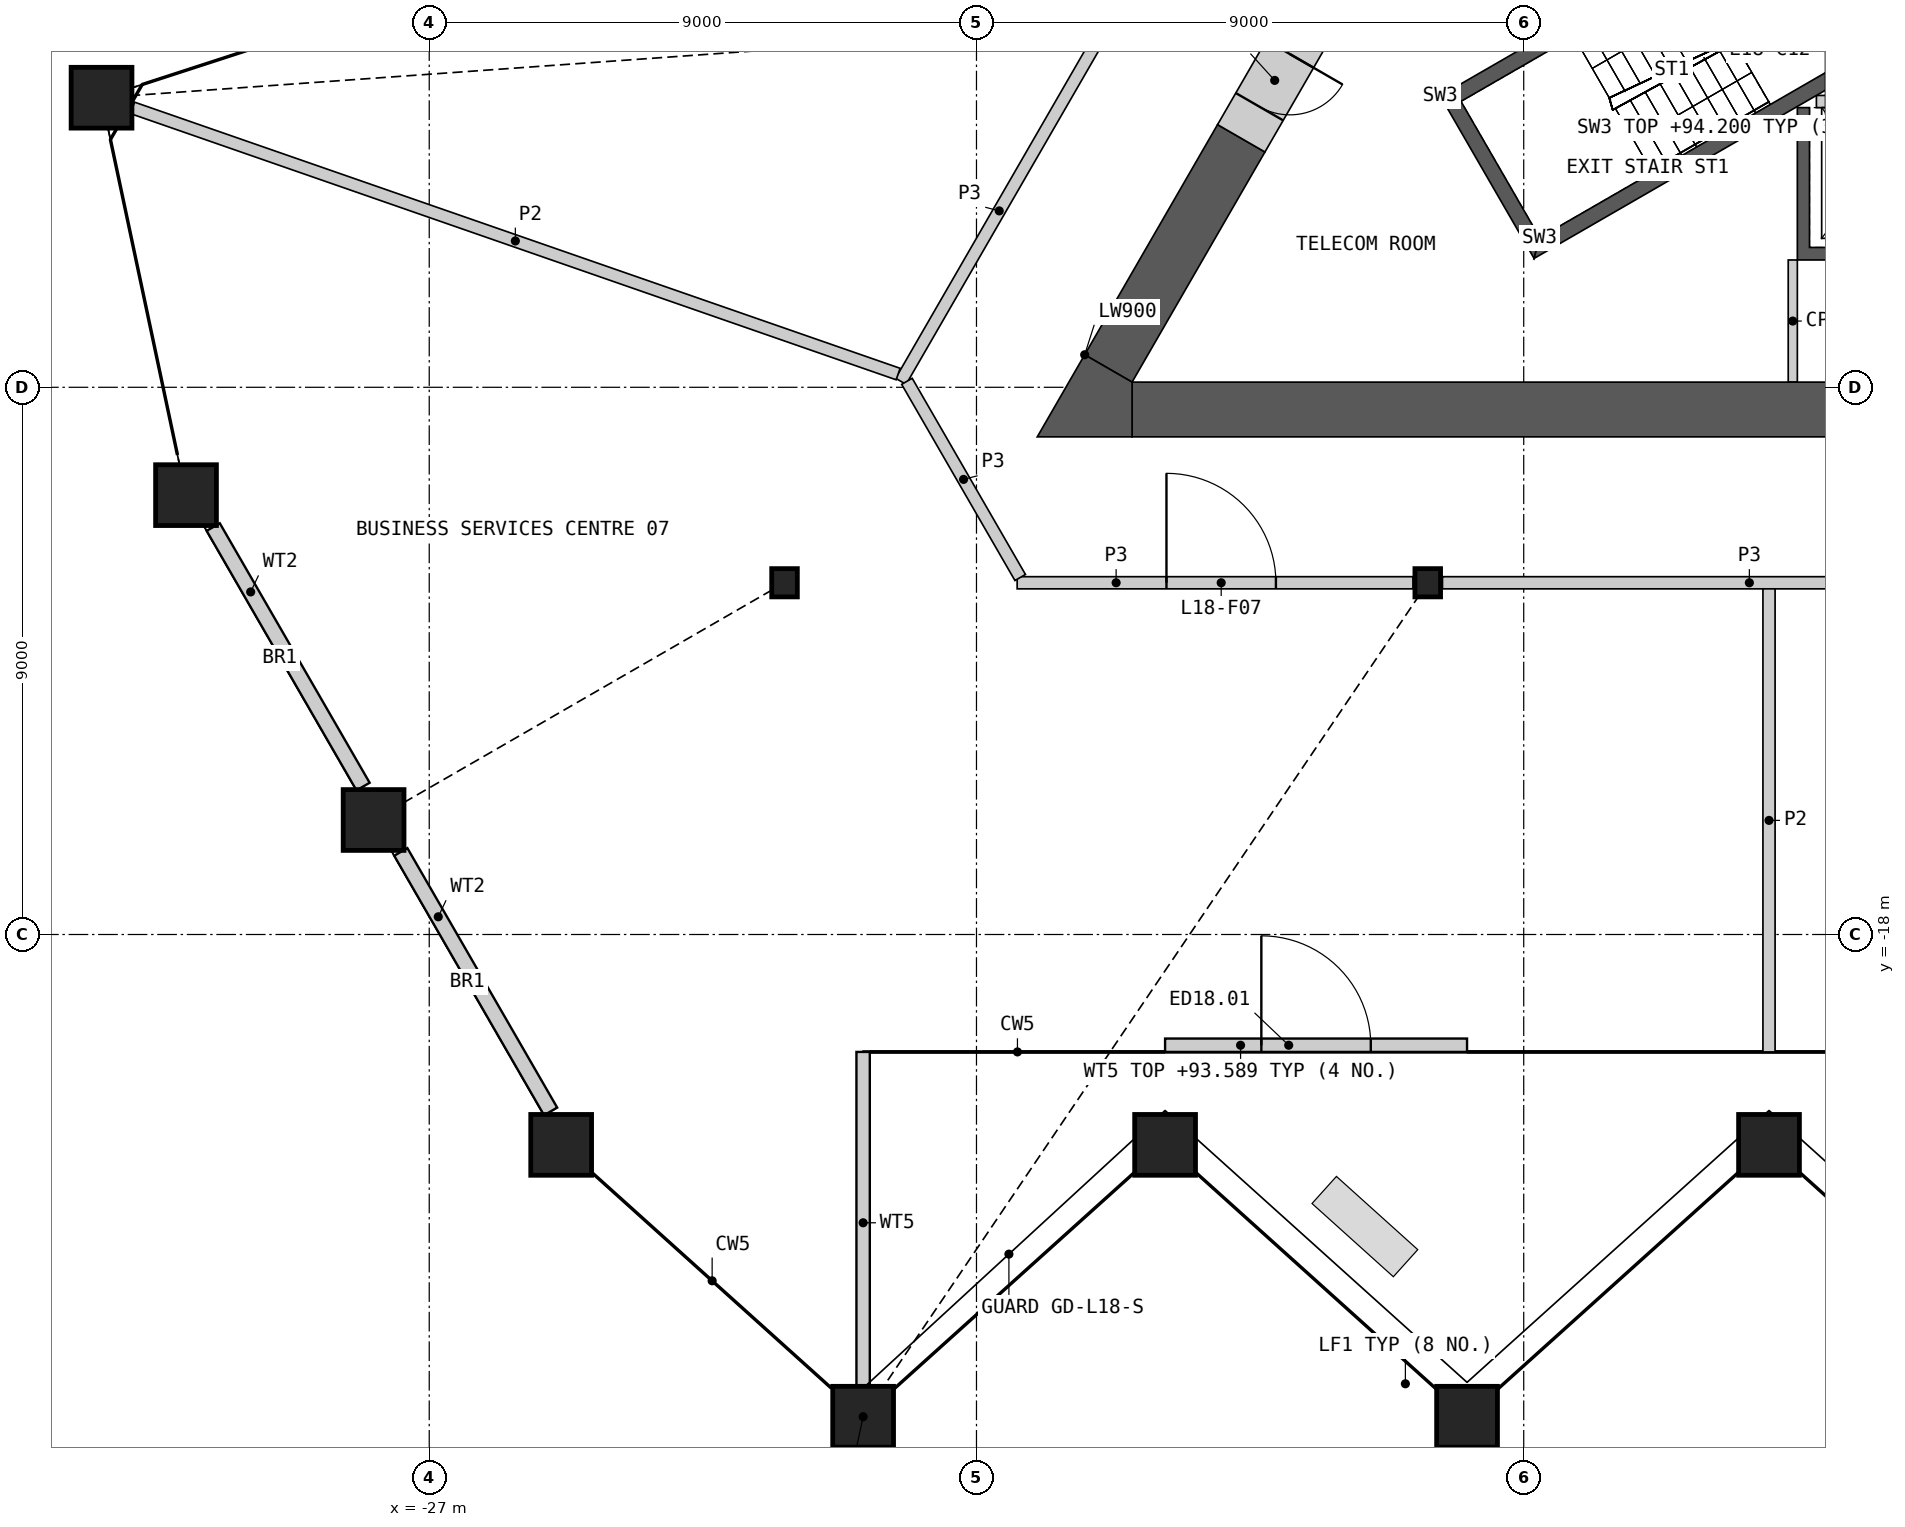
"""IFC4 building model, lengths in metres.
Left out: names, types, materials, properties, quantities, classifications, styles, units other than length and angle.
Written with IfcOpenShell. Run it as: python <this file> out.ifc"""

import sys

from ifc_helpers import new_model, si_unit, direction, frame, frame_2d, origin, origin_2d, place, context, subcontext, project, spatial, polyline, rectangle, hollow_rectangle, i_section, outline, extrude, element, fill, save


model = new_model("IFC4")
c1 = context("Model", 3, precision=1e-05, world=origin(), true_north=direction((0.0, 1.0)))
c2 = subcontext(c1, "Body", "Model", "MODEL_VIEW")
j1 = project(units=[si_unit("LENGTHUNIT", "METRE"), si_unit("PLANEANGLEUNIT", "RADIAN")], contexts=[c1])
p1 = place(None, origin())
s1 = spatial("IfcSite", under=j1, at=p1, CompositionType="ELEMENT")
p2 = place(p1, origin())
s2 = spatial("IfcBuilding", under=s1, at=p2, CompositionType="ELEMENT")
p3 = place(p2, frame((0.0, 0.0, 84.6)))
s3 = spatial("IfcBuildingStorey", under=s2, at=p3, CompositionType="ELEMENT", Elevation=84.6)
for number, where, z_axis, x_axis in (
    (1, (-24.83, -21.46, 0.0), (0.0, 0.0, 1.0), (1.0, 0.0, 0.0)),
    (2, (-19.864, -25.931, 0.0), (0.0, 0.0, 1.0), (1.0, 0.0, 0.0)),
    (3, (-14.898, -21.46, 0.0), (0.0, 0.0, 1.0), (1.0, 0.0, 0.0)),
    (4, (-9.932, -25.931, 0.0), (0.0, 0.0, 1.0), (1.0, 0.0, 0.0)),
    (5, (-4.966, -21.46, 0.0), (0.0, 0.0, 1.0), (1.0, 0.0, 0.0)),
    (6, (-32.389, -4.237, 0.0), (0.0, 0.0, 1.0), (1.0, 0.0, 0.0)),
    (7, (-31.0, -10.774, 0.0), (0.0, 0.0, 1.0), (1.0, 0.0, 0.0)),
    (8, (-27.915, -16.117, 0.0), (0.0, 0.0, 1.0), (1.0, 0.0, 0.0)),
):
    element("IfcColumn", number, at=place(p3, frame(where, z_axis=z_axis, x_axis=x_axis)), inside=s3, PredefinedType="COLUMN", context=c2, shape_type="SweptSolid", body=[
        extrude(hollow_rectangle(XDim=1.0, YDim=1.0, WallThickness=0.07, at=origin_2d()), origin(), (0.0, 0.0, 1.0), 10.0),
    ])
for number, where, z_axis, x_axis in (
    (9, (-21.157, -12.215, 0.0), (0.0, 0.0, 1.0), (1.0, 0.0, 0.0)),
    (10, (-10.578, -12.215, 0.0), (0.0, 0.0, 1.0), (1.0, 0.0, 0.0)),
):
    element("IfcColumn", number, at=place(p3, frame(where, z_axis=z_axis, x_axis=x_axis)), inside=s3, PredefinedType="COLUMN", context=c2, shape_type="SweptSolid", body=[
        extrude(i_section(OverallWidth=0.421, OverallDepth=0.465, WebThickness=0.045, FlangeThickness=0.072, at=origin_2d()), origin(), (0.0, 0.0, 1.0), 10.0),
    ])
for number, where, z_axis, x_axis in (
    (11, (-30.552, -11.299, 0.0), (0.0, 0.0, 1.0), (0.5, -0.866, 0.0)),
    (12, (-27.468, -16.642, 0.0), (0.0, 0.0, 1.0), (0.5, -0.866, 0.0)),
):
    element("IfcWall", number, at=place(p3, frame(where, z_axis=z_axis, x_axis=x_axis)), inside=s3, PredefinedType="SOLIDWALL", context=c2, shape_type="SweptSolid", body=[
        extrude(rectangle(XDim=4.928, YDim=0.25, at=frame_2d((2.464, 0.0))), origin(), (0.0, 0.0, 1.0), 8.989),
    ])
p4 = place(p3, frame((-14.898, -19.821, 0.0), z_axis=(0.0, 0.0, 1.0), x_axis=(1.0, 0.0, 0.0)))
e13 = element("IfcWall", 13, at=p4, inside=s3, PredefinedType="SOLIDWALL", context=c2, shape_type="SweptSolid", body=[
    extrude(rectangle(XDim=4.966, YDim=0.22, at=frame_2d((2.483, 0.0))), origin(), (0.0, 0.0, 1.0), 8.989),
])
p5 = place(p4, frame((1.583, 0.0, 0.0)))
e14 = element("IfcOpeningElement", 14, at=p5, cuts=e13, PredefinedType="OPENING", context=c2, shape_type="SweptSolid", body=[
    extrude(rectangle(XDim=1.8, YDim=2.4, at=frame_2d((0.9, 1.2))), frame((0.0, 0.12, 0.0), z_axis=(0.0, -1.0, 0.0), x_axis=(1.0, 0.0, 0.0)), (0.0, 0.0, 1.0), 0.24),
])
p6 = place(p3, frame((-19.864, -25.551, 0.0), z_axis=(0.0, 0.0, 1.0), x_axis=(0.0, 1.0, 0.0)))
e15 = element("IfcWall", 15, at=p6, inside=s3, PredefinedType="SOLIDWALL", context=c2, shape_type="SweptSolid", body=[
    extrude(rectangle(XDim=5.62, YDim=0.22, at=frame_2d((2.81, 0.0))), origin(), (0.0, 0.0, 1.0), 8.989),
])
p7 = place(p3, origin())
e16 = element("IfcWall", 16, at=p7, inside=s3, PredefinedType="SHEAR", context=c2, shape_type="SweptSolid", body=[
    extrude(outline(polyline([(4.5, -4.4), (4.5, -6.906), (-4.5, -6.906), (-4.5, -4.4), (-4.3, -4.4), (-4.3, -6.7), (-2.3, -6.7), (-2.3, -4.4), (-2.1, -4.4), (-2.1, -6.7), (-0.1, -6.7), (-0.1, -4.4), (0.1, -4.4), (0.1, -6.7), (2.1, -6.7), (2.1, -4.4), (2.3, -4.4), (2.3, -6.7), (4.3, -6.7), (4.3, -4.4), (4.5, -4.4)])), origin(), (0.0, 0.0, 1.0), 9.6),
])
p8 = place(p3, frame((-4.187, -4.3, 0.0), z_axis=(0.0, 0.0, 1.0), x_axis=(1.0, 0.0, 0.0)))
e17 = element("IfcWall", 17, at=p8, inside=s3, PredefinedType="SOLIDWALL", context=c2, shape_type="SweptSolid", body=[
    extrude(rectangle(XDim=8.373, YDim=0.2, at=frame_2d((4.187, 0.0))), origin(), (0.0, 0.0, 1.0), 9.6),
])
p9 = place(p8, frame((0.287, 0.0, 0.0)))
e18 = element("IfcOpeningElement", 18, at=p9, cuts=e17, PredefinedType="OPENING", context=c2, shape_type="SweptSolid", body=[
    extrude(rectangle(XDim=1.2, YDim=2.1, at=frame_2d((0.6, 1.05))), frame((0.0, 0.11, 0.0), z_axis=(0.0, -1.0, 0.0), x_axis=(1.0, 0.0, 0.0)), (0.0, 0.0, 1.0), 0.22),
])
p10 = place(p8, frame((2.387, 0.0, 0.0)))
e19 = element("IfcOpeningElement", 19, at=p10, cuts=e17, PredefinedType="OPENING", context=c2, shape_type="SweptSolid", body=[
    extrude(rectangle(XDim=1.4, YDim=2.1, at=frame_2d((0.7, 1.05))), frame((0.0, 0.11, 0.0), z_axis=(0.0, -1.0, 0.0), x_axis=(1.0, 0.0, 0.0)), (0.0, 0.0, 1.0), 0.22),
])
p11 = place(p8, frame((4.737, 0.0, 0.0)))
e20 = element("IfcOpeningElement", 20, at=p11, cuts=e17, PredefinedType="OPENING", context=c2, shape_type="SweptSolid", body=[
    extrude(rectangle(XDim=1.1, YDim=2.1, at=frame_2d((0.55, 1.05))), frame((0.0, 0.11, 0.0), z_axis=(0.0, -1.0, 0.0), x_axis=(1.0, 0.0, 0.0)), (0.0, 0.0, 1.0), 0.22),
])
p12 = place(p8, frame((6.887, 0.0, 0.0)))
e21 = element("IfcOpeningElement", 21, at=p12, cuts=e17, PredefinedType="OPENING", context=c2, shape_type="SweptSolid", body=[
    extrude(rectangle(XDim=1.2, YDim=2.1, at=frame_2d((0.6, 1.05))), frame((0.0, 0.11, 0.0), z_axis=(0.0, -1.0, 0.0), x_axis=(1.0, 0.0, 0.0)), (0.0, 0.0, 1.0), 0.22),
])
p13 = place(p3, origin())
e22 = element("IfcWall", 22, at=p13, inside=s3, PredefinedType="SHEAR", context=c2, shape_type="SweptSolid", body=[
    extrude(outline(polyline([(-5.307, -1.281), (-10.374, -4.206), (-10.032, -4.298), (-5.182, -1.498), (-5.307, -1.281)])), origin(), (0.0, 0.0, 1.0), 9.6),
])
p14 = place(p3, origin())
e23 = element("IfcWall", 23, at=p14, inside=s3, PredefinedType="SHEAR", context=c2, shape_type="SweptSolid", body=[
    extrude(outline(polyline([(-10.374, -4.206), (-8.83, -6.881), (-8.738, -6.539), (-10.032, -4.298), (-10.374, -4.206)])), origin(), (0.0, 0.0, 1.0), 9.6),
])
p15 = place(p3, origin())
e24 = element("IfcWall", 24, at=p15, inside=s3, PredefinedType="SHEAR", context=c2, shape_type="SweptSolid", body=[
    extrude(outline(polyline([(-8.738, -6.539), (-8.83, -6.881), (-3.763, -3.956), (-3.888, -3.739), (-8.738, -6.539)])), origin(), (0.0, 0.0, 1.0), 9.6),
])
p16 = place(p3, frame((-5.199, -1.219, 0.0), z_axis=(0.0, 0.0, 1.0), x_axis=(0.499982516597, -0.866035497597, 0.0)))
e25 = element("IfcWall", 25, at=p16, inside=s3, PredefinedType="SHEAR", context=c2, shape_type="SweptSolid", body=[
    extrude(rectangle(XDim=3.088, YDim=0.25, at=frame_2d((1.544, 0.0))), origin(), (0.0, 0.0, 1.0), 9.6),
])
p17 = place(p16, frame((0.994, 0.0, 0.0)))
e26 = element("IfcOpeningElement", 26, at=p17, cuts=e25, PredefinedType="OPENING", context=c2, shape_type="SweptSolid", body=[
    extrude(rectangle(XDim=1.1, YDim=2.1, at=frame_2d((0.55, 1.05))), frame((0.0, 0.135, 0.0), z_axis=(0.0, -1.0, 0.0), x_axis=(1.0, 0.0, 0.0)), (0.0, 0.0, 1.0), 0.27),
])
p18 = place(p3, frame((-4.575, -6.906, 0.0), z_axis=(0.0, 0.0, 1.0), x_axis=(0.0, -1.0, 0.0)))
e27 = element("IfcWall", 27, at=p18, inside=s3, PredefinedType="PARTITIONING", context=c2, shape_type="SweptSolid", body=[
    extrude(rectangle(XDim=2.009, YDim=0.15, at=frame_2d((1.004, 0.0))), origin(), (0.0, 0.0, 1.0), 9.6),
])
p19 = place(p3, frame((-15.441, -9.365, 0.0), z_axis=(0.0, 0.0, 1.0), x_axis=(1.0, 0.0, 0.0)))
e28 = element("IfcWall", 28, at=p19, inside=s3, PredefinedType="SHEAR", context=c2, shape_type="SweptSolid", body=[
    extrude(rectangle(XDim=14.341, YDim=0.9, at=frame_2d((7.17, 0.0))), origin(), (0.0, 0.0, 1.0), 9.6),
])
p20 = place(p3, frame((-13.646, -4.905, 0.0), z_axis=(0.0, 0.0, 1.0), x_axis=(-0.499990005186, -0.866031174216, 0.0)))
e29 = element("IfcWall", 29, at=p20, inside=s3, PredefinedType="SHEAR", context=c2, shape_type="SweptSolid", body=[
    extrude(rectangle(XDim=4.371, YDim=0.9, at=frame_2d((2.185, 0.0))), origin(), (0.0, 0.0, 1.0), 9.6),
])
p21 = place(p3, origin())
e30 = element("IfcWall", 30, at=p21, inside=s3, PredefinedType="SHEAR", context=c2, shape_type="SweptSolid", body=[
    extrude(outline(polyline([(-16.221, -8.465), (-15.441, -8.915), (-15.441, -9.815), (-17.0, -9.815), (-16.221, -8.465)])), origin(), (0.0, 0.0, 1.0), 9.6),
])
p22 = place(p3, frame((-12.546, -3.0, 0.0), z_axis=(0.0, 0.0, 1.0), x_axis=(-0.499994660107, -0.866028486751, 0.0)))
e31 = element("IfcWall", 31, at=p22, inside=s3, PredefinedType="SHEAR", context=c2, shape_type="SweptSolid", body=[
    extrude(rectangle(XDim=2.2, YDim=0.9, at=frame_2d((1.1, 0.0))), origin(), (0.0, 0.0, 1.0), 9.6),
])
p23 = place(p22, frame((0.6, 0.0, 0.0)))
e32 = element("IfcOpeningElement", 32, at=p23, cuts=e31, PredefinedType="OPENING", context=c2, shape_type="SweptSolid", body=[
    extrude(rectangle(XDim=1.0, YDim=2.1, at=frame_2d((0.5, 1.05))), frame((0.0, 0.46, 0.0), z_axis=(0.0, -1.0, 0.0), x_axis=(1.0, 0.0, 0.0)), (0.0, 0.0, 1.0), 0.92),
])
p24 = place(p3, frame((-10.336, -12.215, 0.0), z_axis=(0.0, 0.0, 1.0), x_axis=(1.0, 0.0, 0.0)))
e33 = element("IfcWall", 33, at=p24, inside=s3, PredefinedType="PARTITIONING", context=c2, shape_type="SweptSolid", body=[
    extrude(rectangle(XDim=10.094, YDim=0.2, at=frame_2d((5.047, 0.0))), origin(), (0.0, 0.0, 1.0), 9.6),
])
p25 = place(p3, frame((-17.331, -12.215, 0.0), z_axis=(0.0, 0.0, 1.0), x_axis=(1.0, 0.0, 0.0)))
e34 = element("IfcWall", 34, at=p25, inside=s3, PredefinedType="PARTITIONING", context=c2, shape_type="SweptSolid", body=[
    extrude(rectangle(XDim=6.51, YDim=0.2, at=frame_2d((3.255, 0.0))), origin(), (0.0, 0.0, 1.0), 9.6),
])
p26 = place(p25, frame((2.455, 0.0, 0.0)))
e35 = element("IfcOpeningElement", 35, at=p26, cuts=e34, PredefinedType="OPENING", context=c2, shape_type="SweptSolid", body=[
    extrude(rectangle(XDim=1.8, YDim=2.1, at=frame_2d((0.9, 1.05))), frame((0.0, 0.11, 0.0), z_axis=(0.0, -1.0, 0.0), x_axis=(1.0, 0.0, 0.0)), (0.0, 0.0, 1.0), 0.22),
])
p27 = place(p3, frame((-19.244, -8.902, 0.0), z_axis=(0.0, 0.0, 1.0), x_axis=(0.499984737558, 0.86603421538, 0.0)))
e36 = element("IfcWall", 36, at=p27, inside=s3, PredefinedType="PARTITIONING", context=c2, shape_type="SweptSolid", body=[
    extrude(rectangle(XDim=6.473, YDim=0.2, at=frame_2d((3.236, 0.0))), origin(), (0.0, 0.0, 1.0), 9.6),
])
p28 = place(p3, frame((-19.144, -8.902, 0.0), z_axis=(0.0, 0.0, 1.0), x_axis=(0.499958791762, -0.866049194065, 0.0)))
e37 = element("IfcWall", 37, at=p28, inside=s3, PredefinedType="PARTITIONING", context=c2, shape_type="SweptSolid", body=[
    extrude(rectangle(XDim=3.726, YDim=0.2, at=frame_2d((1.863, 0.0))), origin(), (0.0, 0.0, 1.0), 9.6),
])
p29 = place(p3, frame((-31.879, -4.405, 0.0), z_axis=(0.0, 0.0, 1.0), x_axis=(0.944544719933, -0.328382813263, 0.0)))
e38 = element("IfcWall", 38, at=p29, inside=s3, PredefinedType="PARTITIONING", context=c2, shape_type="SweptSolid", body=[
    extrude(rectangle(XDim=13.33, YDim=0.2, at=frame_2d((6.665, 0.0))), origin(), (0.0, 0.0, 1.0), 8.685),
])
p30 = place(p3, frame((-4.966, -19.931, 0.0), z_axis=(0.0, 0.0, 1.0), x_axis=(0.0, 1.0, 0.0)))
e39 = element("IfcWall", 39, at=p30, inside=s3, PredefinedType="PARTITIONING", context=c2, shape_type="SweptSolid", body=[
    extrude(rectangle(XDim=7.616, YDim=0.2, at=frame_2d((3.808, 0.0))), origin(), (0.0, 0.0, 1.0), 8.685),
])
p31 = place(p5, origin())
e40 = element("IfcDoor", 40, at=p31, inside=s3, OperationType="DOUBLE_DOOR_SINGLE_SWING", PredefinedType="DOOR", context=c2, shape_type="SweptSolid", body=[
    extrude(rectangle(XDim=1.8, YDim=2.4, at=frame_2d((0.9, 1.2))), frame((0.0, 0.025, 0.0), z_axis=(0.0, -1.0, 0.0), x_axis=(1.0, 0.0, 0.0)), (0.0, 0.0, 1.0), 0.05),
])
fill(e14, e40)
p32 = place(p23, origin())
e41 = element("IfcDoor", 41, at=p32, inside=s3, OperationType="SINGLE_SWING_LEFT", PredefinedType="DOOR", context=c2, shape_type="SweptSolid", body=[
    extrude(rectangle(XDim=1.0, YDim=2.1, at=frame_2d((0.5, 1.05))), frame((0.0, 0.205, 0.0), z_axis=(0.0, -1.0, 0.0), x_axis=(1.0, 0.0, 0.0)), (0.0, 0.0, 1.0), 0.05),
])
fill(e32, e41)
p33 = place(p26, origin())
e42 = element("IfcDoor", 42, at=p33, inside=s3, OperationType="DOUBLE_DOOR_SINGLE_SWING", PredefinedType="DOOR", context=c2, shape_type="SweptSolid", body=[
    extrude(rectangle(XDim=1.8, YDim=2.1, at=frame_2d((0.9, 1.05))), frame((0.0, 0.025, 0.0), z_axis=(0.0, -1.0, 0.0), x_axis=(1.0, 0.0, 0.0)), (0.0, 0.0, 1.0), 0.05),
])
fill(e35, e42)
save(model, sys.argv[1])
